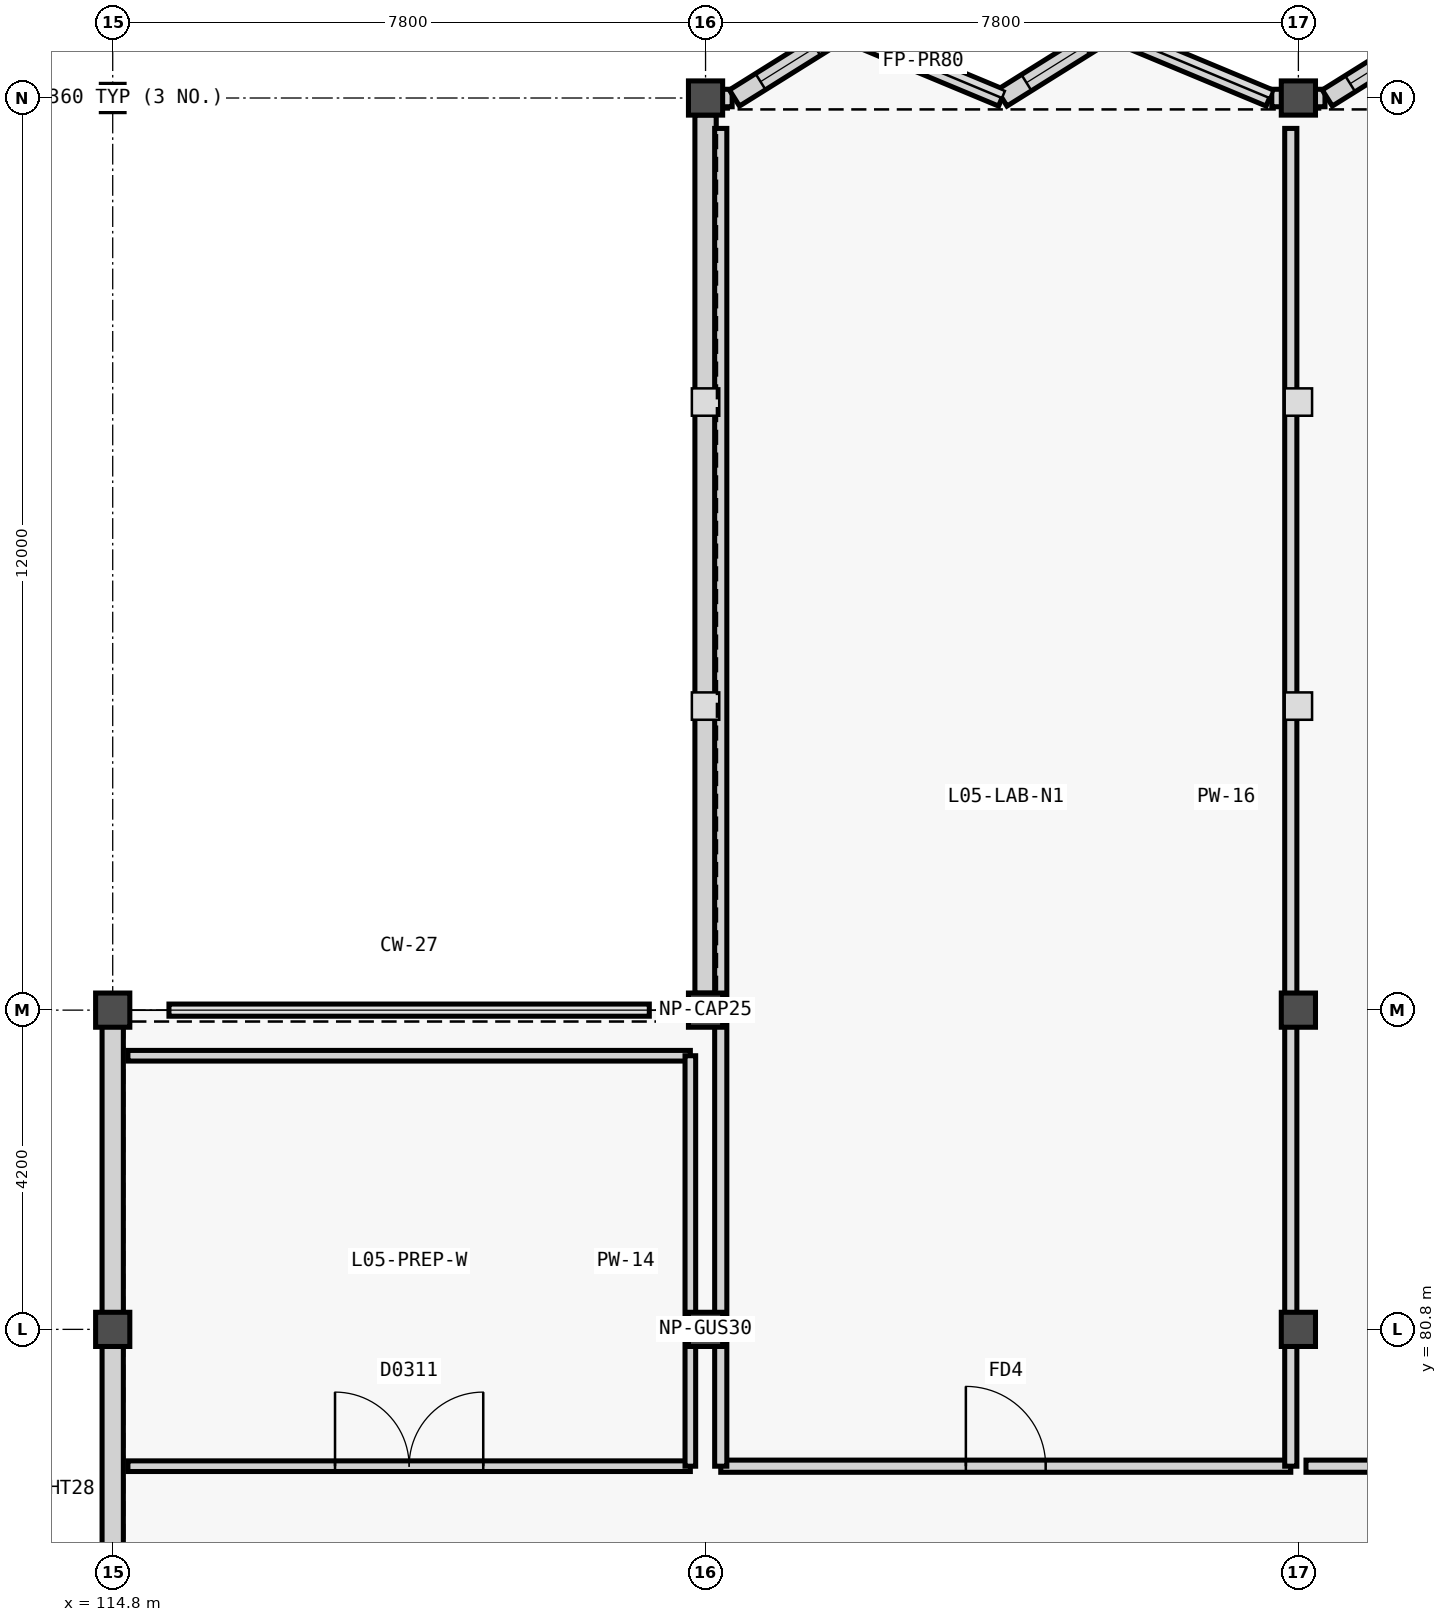
"""IFC4 building model, lengths in metres.
Left out: names, types, materials, properties, quantities, classifications, styles, units other than length and angle.
Written with IfcOpenShell. Run it as: python <this file> out.ifc"""

import sys

from ifc_helpers import new_model, si_unit, direction, frame, frame_2d, origin, origin_2d, place, context, subcontext, project, spatial, rectangle, i_section, extrude, element, fill, save


model = new_model("IFC4")
c1 = context("Model", 3, precision=1e-05, world=origin(), true_north=direction((0.0, 1.0)))
c2 = subcontext(c1, "Body", "Model", "MODEL_VIEW")
j1 = project(units=[si_unit("LENGTHUNIT", "METRE"), si_unit("PLANEANGLEUNIT", "RADIAN")], contexts=[c1])
p1 = place(None, origin())
s1 = spatial("IfcSite", under=j1, at=p1, CompositionType="ELEMENT")
p2 = place(p1, origin())
s2 = spatial("IfcBuilding", under=s1, at=p2, CompositionType="ELEMENT")
p3 = place(p2, frame((0.0, 0.0, 21.6)))
s3 = spatial("IfcBuildingStorey", under=s2, at=p3, CompositionType="ELEMENT", Elevation=21.6)
for number, where, z_axis, x_axis in (
    (1, (114.8, 80.8, 0.0), (0.0, 0.0, 1.0), (1.0, 0.0, 0.0)),
    (2, (114.8, 85.0, 0.0), (0.0, 0.0, 1.0), (1.0, 0.0, 0.0)),
):
    element("IfcColumn", number, at=place(p3, frame(where, z_axis=z_axis, x_axis=x_axis)), inside=s3, PredefinedType="COLUMN", context=c2, shape_type="SweptSolid", body=[
        extrude(rectangle(XDim=0.45, YDim=0.45, at=origin_2d()), origin(), (0.0, 0.0, 1.0), 3.6),
    ])
p4 = place(p3, frame((114.8, 97.0, 0.0), z_axis=(0.0, 0.0, 1.0), x_axis=(1.0, 0.0, 0.0)))
e3 = element("IfcColumn", 3, at=p4, inside=s3, PredefinedType="COLUMN", context=c2, shape_type="SweptSolid", body=[
    extrude(i_section(OverallWidth=0.3, OverallDepth=0.36, WebThickness=0.012, FlangeThickness=0.022, FilletRadius=0.027, at=origin_2d()), origin(), (0.0, 0.0, 1.0), 3.79),
])
for number, where, z_axis, x_axis in (
    (4, (122.6, 80.8, 0.0), (0.0, 0.0, 1.0), (1.0, 0.0, 0.0)),
    (5, (122.6, 85.0, 0.0), (0.0, 0.0, 1.0), (1.0, 0.0, 0.0)),
):
    element("IfcColumn", number, at=place(p3, frame(where, z_axis=z_axis, x_axis=x_axis)), inside=s3, PredefinedType="COLUMN", context=c2, shape_type="SweptSolid", body=[
        extrude(rectangle(XDim=0.45, YDim=0.45, at=origin_2d()), origin(), (0.0, 0.0, 1.0), 3.6),
    ])
p5 = place(p3, frame((122.6, 97.0, -0.24), z_axis=(0.0, 0.0, 1.0), x_axis=(1.0, 0.0, 0.0)))
e6 = element("IfcColumn", 6, at=p5, inside=s3, PredefinedType="COLUMN", context=c2, shape_type="SweptSolid", body=[
    extrude(rectangle(XDim=0.45, YDim=0.45, at=origin_2d()), origin(), (0.0, 0.0, 1.0), 3.84),
])
for number, where, z_axis, x_axis in (
    (7, (130.4, 80.8, 0.0), (0.0, 0.0, 1.0), (1.0, 0.0, 0.0)),
    (8, (130.4, 85.0, 0.0), (0.0, 0.0, 1.0), (1.0, 0.0, 0.0)),
):
    element("IfcColumn", number, at=place(p3, frame(where, z_axis=z_axis, x_axis=x_axis)), inside=s3, PredefinedType="COLUMN", context=c2, shape_type="SweptSolid", body=[
        extrude(rectangle(XDim=0.45, YDim=0.45, at=origin_2d()), origin(), (0.0, 0.0, 1.0), 3.6),
    ])
p6 = place(p3, frame((130.4, 97.0, -0.24), z_axis=(0.0, 0.0, 1.0), x_axis=(1.0, 0.0, 0.0)))
e9 = element("IfcColumn", 9, at=p6, inside=s3, PredefinedType="COLUMN", context=c2, shape_type="SweptSolid", body=[
    extrude(rectangle(XDim=0.45, YDim=0.45, at=origin_2d()), origin(), (0.0, 0.0, 1.0), 3.84),
])
p7 = place(p3, frame((122.6, 85.223, 0.0), z_axis=(0.0, 0.0, 1.0), x_axis=(0.0, 1.0, 0.0)))
e10 = element("IfcWall", 10, at=p7, inside=s3, PredefinedType="SOLIDWALL", context=c2, shape_type="SweptSolid", body=[
    extrude(rectangle(XDim=11.554, YDim=0.28, at=frame_2d((5.777, 0.0))), origin(), (0.0, 0.0, 1.0), 1.98),
])
p8 = place(p3, frame((114.8, 72.6, 0.0), z_axis=(0.0, 0.0, 1.0), x_axis=(0.0, 1.0, 0.0)))
e11 = element("IfcWall", 11, at=p8, inside=s3, PredefinedType="SOLIDWALL", context=c2, shape_type="SweptSolid", body=[
    extrude(rectangle(XDim=12.2, YDim=0.28, at=frame_2d((6.1, 0.0))), origin(), (0.0, 0.0, 1.0), 2.78),
])
for number, where, z_axis, x_axis in (
    (12, (122.6, 97.0, 0.0), (0.0, 0.0, 1.0), (1.0, 0.0, 0.0)),
    (13, (130.05, 97.0, 0.0), (0.0, 0.0, 1.0), (1.0, 0.0, 0.0)),
):
    element("IfcWall", number, at=place(p3, frame(where, z_axis=z_axis, x_axis=x_axis)), inside=s3, PredefinedType="SOLIDWALL", context=c2, shape_type="SweptSolid", body=[
        extrude(rectangle(XDim=0.35, YDim=0.23, at=frame_2d((0.175, 0.0))), origin(), (0.0, 0.0, 1.0), 3.36),
    ])
p9 = place(p3, frame((130.4, 97.0, 0.0), z_axis=(0.0, 0.0, 1.0), x_axis=(1.0, 0.0, 0.0)))
e14 = element("IfcWall", 14, at=p9, inside=s3, PredefinedType="SOLIDWALL", context=c2, shape_type="SweptSolid", body=[
    extrude(rectangle(XDim=0.35, YDim=0.23, at=frame_2d((0.175, 0.0))), origin(), (0.0, 0.0, 1.0), 3.36),
])
p10 = place(p3, frame((122.98, 97.0, 0.0), z_axis=(0.0, 0.0, 1.0), x_axis=(0.848023086369, 0.529959286158, 0.0)))
e15 = element("IfcWall", 15, at=p10, inside=s3, PredefinedType="SOLIDWALL", context=c2, shape_type="SweptSolid", body=[
    extrude(rectangle(XDim=1.66, YDim=0.25, at=frame_2d((0.83, 0.0))), origin(), (0.0, 0.0, 1.0), 3.36),
])
p11 = place(p10, frame((0.405, 0.0, 0.82)))
e16 = element("IfcOpeningElement", 16, at=p11, cuts=e15, PredefinedType="OPENING", context=c2, shape_type="SweptSolid", body=[
    extrude(rectangle(XDim=0.85, YDim=1.4, at=frame_2d((0.425, 0.7))), frame((0.0, 0.135, 0.0), z_axis=(0.0, -1.0, 0.0), x_axis=(1.0, 0.0, 0.0)), (0.0, 0.0, 1.0), 0.27),
])
p12 = place(p3, frame((124.388, 97.88, 0.0), z_axis=(0.0, 0.0, 1.0), x_axis=(0.92309902008, -0.384562347517, 0.0)))
e17 = element("IfcWall", 17, at=p12, inside=s3, PredefinedType="SOLIDWALL", context=c2, shape_type="SweptSolid", body=[
    extrude(rectangle(XDim=2.288, YDim=0.23, at=frame_2d((1.144, 0.0))), origin(), (0.0, 0.0, 1.0), 3.36),
])
p13 = place(p3, frame((126.5, 97.0, 0.0), z_axis=(0.0, 0.0, 1.0), x_axis=(0.848023086369, 0.529959286158, 0.0)))
e18 = element("IfcWall", 18, at=p13, inside=s3, PredefinedType="SOLIDWALL", context=c2, shape_type="SweptSolid", body=[
    extrude(rectangle(XDim=1.66, YDim=0.25, at=frame_2d((0.83, 0.0))), origin(), (0.0, 0.0, 1.0), 3.36),
])
p14 = place(p13, frame((0.38, 0.0, 0.82)))
e19 = element("IfcOpeningElement", 19, at=p14, cuts=e18, PredefinedType="OPENING", context=c2, shape_type="SweptSolid", body=[
    extrude(rectangle(XDim=0.9, YDim=1.45, at=frame_2d((0.45, 0.725))), frame((0.0, 0.135, 0.0), z_axis=(0.0, -1.0, 0.0), x_axis=(1.0, 0.0, 0.0)), (0.0, 0.0, 1.0), 0.27),
])
p15 = place(p3, frame((127.908, 97.88, 0.0), z_axis=(0.0, 0.0, 1.0), x_axis=(0.92309902008, -0.384562347517, 0.0)))
e20 = element("IfcWall", 20, at=p15, inside=s3, PredefinedType="SOLIDWALL", context=c2, shape_type="SweptSolid", body=[
    extrude(rectangle(XDim=2.288, YDim=0.23, at=frame_2d((1.144, 0.0))), origin(), (0.0, 0.0, 1.0), 3.36),
])
p16 = place(p3, frame((130.78, 97.0, 0.0), z_axis=(0.0, 0.0, 1.0), x_axis=(0.848023086369, 0.529959286158, 0.0)))
e21 = element("IfcWall", 21, at=p16, inside=s3, PredefinedType="SOLIDWALL", context=c2, shape_type="SweptSolid", body=[
    extrude(rectangle(XDim=1.66, YDim=0.25, at=frame_2d((0.83, 0.0))), origin(), (0.0, 0.0, 1.0), 3.36),
])
p17 = place(p16, frame((0.355, 0.0, 0.82)))
e22 = element("IfcOpeningElement", 22, at=p17, cuts=e21, PredefinedType="OPENING", context=c2, shape_type="SweptSolid", body=[
    extrude(rectangle(XDim=0.95, YDim=1.5, at=frame_2d((0.475, 0.75))), frame((0.0, 0.135, 0.0), z_axis=(0.0, -1.0, 0.0), x_axis=(1.0, 0.0, 0.0)), (0.0, 0.0, 1.0), 0.27),
])
p18 = place(p2, frame((0.0, 0.0, 14.4)))
s4 = spatial("IfcBuildingStorey", under=s2, at=p18, CompositionType="ELEMENT", Elevation=14.4)
p19 = place(p18, frame((106.85, 97.0, 0.0), z_axis=(0.0, 0.0, 1.0), x_axis=(1.0, 0.0, 0.0)))
e23 = element("IfcWall", 23, at=p19, inside=s4, PredefinedType="SOLIDWALL", context=c2, shape_type="SweptSolid", body=[
    extrude(rectangle(XDim=7.5, YDim=0.3, at=frame_2d((3.75, 0.0))), origin(), (0.0, 0.0, 1.0), 10.4),
])
p20 = place(p19, frame((2.0, 0.0, 1.1)))
e24 = element("IfcOpeningElement", 24, at=p20, cuts=e23, PredefinedType="OPENING", context=c2, shape_type="SweptSolid", body=[
    extrude(rectangle(XDim=3.2, YDim=1.25, at=frame_2d((1.6, 0.625))), frame((0.0, 0.16, 0.0), z_axis=(0.0, -1.0, 0.0), x_axis=(1.0, 0.0, 0.0)), (0.0, 0.0, 1.0), 0.32),
])
p21 = place(p3, frame((115.0, 79.0, 0.0), z_axis=(0.0, 0.0, 1.0), x_axis=(1.0, 0.0, 0.0)))
e25 = element("IfcWall", 25, at=p21, inside=s3, PredefinedType="PARTITIONING", context=c2, shape_type="SweptSolid", body=[
    extrude(rectangle(XDim=7.4, YDim=0.14, at=frame_2d((3.7, 0.0))), origin(), (0.0, 0.0, 1.0), 3.34),
])
p22 = place(p21, frame((2.725, 0.0, 0.0)))
e26 = element("IfcOpeningElement", 26, at=p22, cuts=e25, PredefinedType="OPENING", context=c2, shape_type="SweptSolid", body=[
    extrude(rectangle(XDim=1.95, YDim=2.35, at=frame_2d((0.975, 1.175))), frame((0.0, 0.08, 0.0), z_axis=(0.0, -1.0, 0.0), x_axis=(1.0, 0.0, 0.0)), (0.0, 0.0, 1.0), 0.16),
])
p23 = place(p3, frame((115.0, 84.4, 0.0), z_axis=(0.0, 0.0, 1.0), x_axis=(1.0, 0.0, 0.0)))
e27 = element("IfcWall", 27, at=p23, inside=s3, PredefinedType="PARTITIONING", context=c2, shape_type="SweptSolid", body=[
    extrude(rectangle(XDim=7.4, YDim=0.14, at=frame_2d((3.7, 0.0))), origin(), (0.0, 0.0, 1.0), 3.34),
])
p24 = place(p3, frame((122.4, 79.0, 0.0), z_axis=(0.0, 0.0, 1.0), x_axis=(0.0, 1.0, 0.0)))
e28 = element("IfcWall", 28, at=p24, inside=s3, PredefinedType="PARTITIONING", context=c2, shape_type="SweptSolid", body=[
    extrude(rectangle(XDim=5.4, YDim=0.14, at=frame_2d((2.7, 0.0))), origin(), (0.0, 0.0, 1.0), 1.98),
])
p25 = place(p3, frame((122.8, 79.0, 0.0), z_axis=(0.0, 0.0, 1.0), x_axis=(1.0, 0.0, 0.0)))
e29 = element("IfcWall", 29, at=p25, inside=s3, PredefinedType="PARTITIONING", context=c2, shape_type="SweptSolid", body=[
    extrude(rectangle(XDim=7.5, YDim=0.16, at=frame_2d((3.75, 0.0))), origin(), (0.0, 0.0, 1.0), 3.34),
])
p26 = place(p25, frame((3.225, 0.0, 0.0)))
e30 = element("IfcOpeningElement", 30, at=p26, cuts=e29, PredefinedType="OPENING", context=c2, shape_type="SweptSolid", body=[
    extrude(rectangle(XDim=1.05, YDim=2.15, at=frame_2d((0.525, 1.075))), frame((0.0, 0.09, 0.0), z_axis=(0.0, -1.0, 0.0), x_axis=(1.0, 0.0, 0.0)), (0.0, 0.0, 1.0), 0.18),
])
for number, where, z_axis, x_axis in (
    (31, (122.8, 79.0, 0.0), (0.0, 0.0, 1.0), (0.0, 1.0, 0.0)),
    (32, (130.3, 79.0, 0.0), (0.0, 0.0, 1.0), (0.0, 1.0, 0.0)),
):
    element("IfcWall", number, at=place(p3, frame(where, z_axis=z_axis, x_axis=x_axis)), inside=s3, PredefinedType="PARTITIONING", context=c2, shape_type="SweptSolid", body=[
        extrude(rectangle(XDim=17.6, YDim=0.16, at=frame_2d((8.8, 0.0))), origin(), (0.0, 0.0, 1.0), 1.98),
    ])
p27 = place(p3, frame((130.5, 79.0, 0.0), z_axis=(0.0, 0.0, 1.0), x_axis=(1.0, 0.0, 0.0)))
e33 = element("IfcWall", 33, at=p27, inside=s3, PredefinedType="PARTITIONING", context=c2, shape_type="SweptSolid", body=[
    extrude(rectangle(XDim=7.6, YDim=0.16, at=frame_2d((3.8, 0.0))), origin(), (0.0, 0.0, 1.0), 3.34),
])
p28 = place(p27, frame((3.175, 0.0, 0.0)))
e34 = element("IfcOpeningElement", 34, at=p28, cuts=e33, PredefinedType="OPENING", context=c2, shape_type="SweptSolid", body=[
    extrude(rectangle(XDim=1.25, YDim=2.2, at=frame_2d((0.625, 1.1))), frame((0.0, 0.09, 0.0), z_axis=(0.0, -1.0, 0.0), x_axis=(1.0, 0.0, 0.0)), (0.0, 0.0, 1.0), 0.18),
])
p29 = place(p11, origin())
e35 = element("IfcWindow", 35, at=p29, inside=s3, PartitioningType="SINGLE_PANEL", PredefinedType="WINDOW", context=c2, shape_type="SweptSolid", body=[
    extrude(rectangle(XDim=0.85, YDim=1.4, at=frame_2d((0.425, 0.7))), frame((0.0, 0.03, 0.0), z_axis=(0.0, -1.0, 0.0), x_axis=(1.0, 0.0, 0.0)), (0.0, 0.0, 1.0), 0.06),
])
fill(e16, e35)
p30 = place(p14, origin())
e36 = element("IfcWindow", 36, at=p30, inside=s3, PartitioningType="SINGLE_PANEL", PredefinedType="WINDOW", context=c2, shape_type="SweptSolid", body=[
    extrude(rectangle(XDim=0.9, YDim=1.45, at=frame_2d((0.45, 0.725))), frame((0.0, 0.03, 0.0), z_axis=(0.0, -1.0, 0.0), x_axis=(1.0, 0.0, 0.0)), (0.0, 0.0, 1.0), 0.06),
])
fill(e19, e36)
p31 = place(p17, origin())
e37 = element("IfcWindow", 37, at=p31, inside=s3, PartitioningType="SINGLE_PANEL", PredefinedType="WINDOW", context=c2, shape_type="SweptSolid", body=[
    extrude(rectangle(XDim=0.95, YDim=1.5, at=frame_2d((0.475, 0.75))), frame((0.0, 0.03, 0.0), z_axis=(0.0, -1.0, 0.0), x_axis=(1.0, 0.0, 0.0)), (0.0, 0.0, 1.0), 0.06),
])
fill(e22, e37)
p32 = place(p22, origin())
e38 = element("IfcDoor", 38, at=p32, inside=s3, OperationType="DOUBLE_DOOR_SINGLE_SWING", PredefinedType="DOOR", context=c2, shape_type="SweptSolid", body=[
    extrude(rectangle(XDim=1.95, YDim=2.35, at=frame_2d((0.975, 1.175))), frame((0.0, 0.025, 0.0), z_axis=(0.0, -1.0, 0.0), x_axis=(1.0, 0.0, 0.0)), (0.0, 0.0, 1.0), 0.05),
])
fill(e26, e38)
p33 = place(p26, origin())
e39 = element("IfcDoor", 39, at=p33, inside=s3, OperationType="SINGLE_SWING_LEFT", PredefinedType="DOOR", context=c2, shape_type="SweptSolid", body=[
    extrude(rectangle(XDim=1.05, YDim=2.15, at=frame_2d((0.525, 1.075))), frame((0.0, 0.025, 0.0), z_axis=(0.0, -1.0, 0.0), x_axis=(1.0, 0.0, 0.0)), (0.0, 0.0, 1.0), 0.05),
])
fill(e30, e39)
save(model, sys.argv[1])
